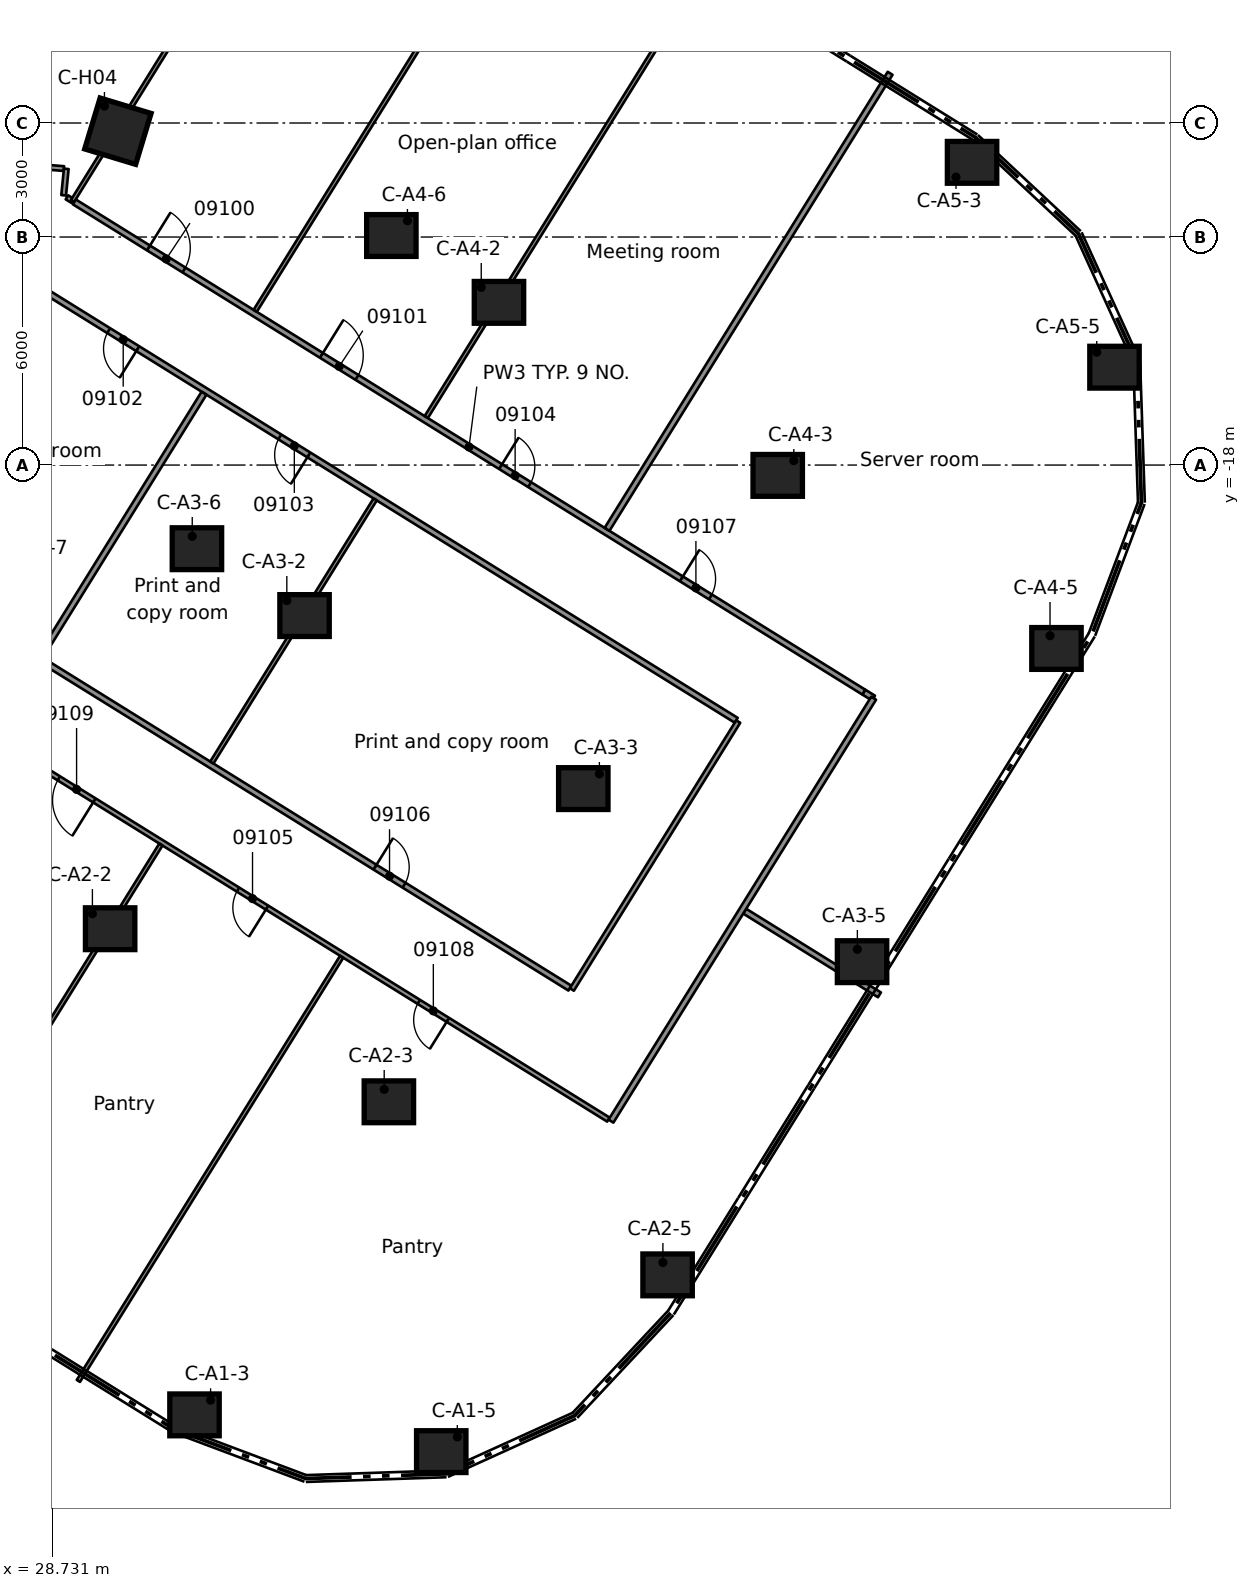
"""IFC4 building model, lengths in metres.
Left out: names, types, materials, properties, quantities, classifications, styles, units other than length and angle.
Written with IfcOpenShell. Run it as: python <this file> out.ifc"""

import sys

from ifc_helpers import new_model, si_unit, direction, frame, frame_2d, origin, origin_2d, place, context, subcontext, project, spatial, rectangle, extrude, element, fill, save


model = new_model("IFC4")
c1 = context("Model", 3, precision=1e-05, world=origin(), true_north=direction((0.0, 1.0)))
c2 = subcontext(c1, "Body", "Model", "MODEL_VIEW")
j1 = project(units=[si_unit("LENGTHUNIT", "METRE"), si_unit("PLANEANGLEUNIT", "RADIAN")], contexts=[c1])
p1 = place(None, origin())
s1 = spatial("IfcSite", under=j1, at=p1, CompositionType="ELEMENT")
p2 = place(p1, origin())
s2 = spatial("IfcBuilding", under=s1, at=p2, CompositionType="ELEMENT")
p3 = place(p2, frame((0.0, 0.0, 40.8)))
s3 = spatial("IfcBuildingStorey", under=s2, at=p3, CompositionType="ELEMENT", Elevation=40.8)
for number, where, z_axis, x_axis in (
    (1, (32.475, -42.992, 0.0), (0.0, 0.0, 1.0), (1.0, 0.0, 0.0)),
    (2, (38.968, -43.959, 0.0), (0.0, 0.0, 1.0), (1.0, 0.0, 0.0)),
    (3, (30.255, -30.2, 0.0), (0.0, 0.0, 1.0), (1.0, 0.0, 0.0)),
    (4, (37.59, -34.754, 0.0), (0.0, 0.0, 1.0), (1.0, 0.0, 0.0)),
    (5, (44.924, -39.308, 0.0), (0.0, 0.0, 1.0), (1.0, 0.0, 0.0)),
    (6, (35.371, -21.96, 0.0), (0.0, 0.0, 1.0), (1.0, 0.0, 0.0)),
    (7, (42.706, -26.513, 0.0), (0.0, 0.0, 1.0), (1.0, 0.0, 0.0)),
    (8, (50.041, -31.067, 0.0), (0.0, 0.0, 1.0), (1.0, 0.0, 0.0)),
    (9, (32.539, -20.201, 0.0), (0.0, 0.0, 1.0), (1.0, 0.0, 0.0)),
    (10, (40.487, -13.719, 0.0), (0.0, 0.0, 1.0), (1.0, 0.0, 0.0)),
    (11, (47.822, -18.272, 0.0), (0.0, 0.0, 1.0), (1.0, 0.0, 0.0)),
    (12, (55.157, -22.826, 0.0), (0.0, 0.0, 1.0), (1.0, 0.0, 0.0)),
    (13, (37.655, -11.96, 0.0), (0.0, 0.0, 1.0), (1.0, 0.0, 0.0)),
    (14, (52.936, -10.035, 0.0), (0.0, 0.0, 1.0), (1.0, 0.0, 0.0)),
    (15, (56.684, -15.425, 0.0), (0.0, 0.0, 1.0), (1.0, 0.0, 0.0)),
):
    element("IfcColumn", number, at=place(p3, frame(where, z_axis=z_axis, x_axis=x_axis)), inside=s3, PredefinedType="COLUMN", context=c2, shape_type="SweptSolid", body=[
        extrude(rectangle(XDim=1.3, YDim=1.1, at=origin_2d()), origin(), (0.0, 0.0, 1.0), 3.5),
    ])
p4 = place(p3, frame((30.459, -9.215, 0.0), z_axis=(0.0, 0.0, 1.0), x_axis=(0.957152868392, -0.289583125422, 0.0)))
e16 = element("IfcColumn", 16, at=p4, inside=s3, PredefinedType="COLUMN", context=c2, shape_type="SweptSolid", body=[
    extrude(rectangle(XDim=1.4, YDim=1.4, at=origin_2d()), origin(), (0.0, 0.0, 1.0), 3.5),
])
p5 = place(p3, frame((43.367, -35.223, 0.0), z_axis=(0.0, 0.0, 1.0), x_axis=(-0.849563429412, 0.527486473197, 0.0)))
e17 = element("IfcWall", 17, at=p5, inside=s3, PredefinedType="PARTITIONING", context=c2, shape_type="SweptSolid", body=[
    extrude(rectangle(XDim=21.927, YDim=0.125, at=frame_2d((10.963, 0.0))), origin(), (0.0, 0.0, 1.0), 3.06),
])
p6 = place(p5, frame((10.574, 0.0, 0.0)))
e18 = element("IfcOpeningElement", 18, at=p6, cuts=e17, PredefinedType="OPENING", context=c2, shape_type="SweptSolid", body=[
    extrude(rectangle(XDim=0.9, YDim=2.1, at=frame_2d((0.45, 1.05))), frame((0.0, 0.073, 0.0), z_axis=(0.0, -1.0, 0.0), x_axis=(1.0, 0.0, 0.0)), (0.0, 0.0, 1.0), 0.145),
])
p7 = place(p5, frame((4.973, 0.0, 0.0)))
e19 = element("IfcOpeningElement", 19, at=p7, cuts=e17, PredefinedType="OPENING", context=c2, shape_type="SweptSolid", body=[
    extrude(rectangle(XDim=0.9, YDim=2.1, at=frame_2d((0.45, 1.05))), frame((0.0, 0.073, 0.0), z_axis=(0.0, -1.0, 0.0), x_axis=(1.0, 0.0, 0.0)), (0.0, 0.0, 1.0), 0.145),
])
p8 = place(p5, frame((15.923, 0.0, 0.0)))
e20 = element("IfcOpeningElement", 20, at=p8, cuts=e17, PredefinedType="OPENING", context=c2, shape_type="SweptSolid", body=[
    extrude(rectangle(XDim=1.1, YDim=2.1, at=frame_2d((0.55, 1.05))), frame((0.0, 0.073, 0.0), z_axis=(0.0, -1.0, 0.0), x_axis=(1.0, 0.0, 0.0)), (0.0, 0.0, 1.0), 0.145),
])
p9 = place(p3, frame((24.028, -20.39, 0.0), z_axis=(0.0, 0.0, 1.0), x_axis=(0.8496545068, -0.527339756775, 0.0)))
e21 = element("IfcWall", 21, at=p9, inside=s3, PredefinedType="PARTITIONING", context=c2, shape_type="SweptSolid", body=[
    extrude(rectangle(XDim=21.569, YDim=0.15, at=frame_2d((10.784, 0.0))), origin(), (0.0, 0.0, 1.0), 3.06),
])
p10 = place(p9, frame((15.532, 0.0, 0.0)))
e22 = element("IfcOpeningElement", 22, at=p10, cuts=e21, PredefinedType="OPENING", context=c2, shape_type="SweptSolid", body=[
    extrude(rectangle(XDim=0.9, YDim=2.1, at=frame_2d((0.45, 1.05))), frame((0.0, 0.085, 0.0), z_axis=(0.0, -1.0, 0.0), x_axis=(1.0, 0.0, 0.0)), (0.0, 0.0, 1.0), 0.17),
])
p11 = place(p3, frame((46.953, -29.739, 0.0), z_axis=(0.0, 0.0, 1.0), x_axis=(0.849653722919, -0.527341019767, 0.0)))
e23 = element("IfcWall", 23, at=p11, inside=s3, PredefinedType="PARTITIONING", context=c2, shape_type="SweptSolid", body=[
    extrude(rectangle(XDim=4.174, YDim=0.15, at=frame_2d((2.087, 0.0))), origin(), (0.0, 0.0, 1.0), 3.06),
])
p12 = place(p3, frame((46.73, -24.716, 0.0), z_axis=(0.0, 0.0, 1.0), x_axis=(-0.849574284109, 0.527468990349, 0.0)))
e24 = element("IfcWall", 24, at=p12, inside=s3, PredefinedType="PARTITIONING", context=c2, shape_type="SweptSolid", body=[
    extrude(rectangle(XDim=21.645, YDim=0.15, at=frame_2d((10.822, 0.0))), origin(), (0.0, 0.0, 1.0), 3.06),
])
p13 = place(p12, frame((18.537, 0.0, 0.0)))
e25 = element("IfcOpeningElement", 25, at=p13, cuts=e24, PredefinedType="OPENING", context=c2, shape_type="SweptSolid", body=[
    extrude(rectangle(XDim=0.9, YDim=2.1, at=frame_2d((0.45, 1.05))), frame((0.0, 0.085, 0.0), z_axis=(0.0, -1.0, 0.0), x_axis=(1.0, 0.0, 0.0)), (0.0, 0.0, 1.0), 0.17),
])
p14 = place(p12, frame((13.237, 0.0, 0.0)))
e26 = element("IfcOpeningElement", 26, at=p14, cuts=e24, PredefinedType="OPENING", context=c2, shape_type="SweptSolid", body=[
    extrude(rectangle(XDim=0.9, YDim=2.1, at=frame_2d((0.45, 1.05))), frame((0.0, 0.085, 0.0), z_axis=(0.0, -1.0, 0.0), x_axis=(1.0, 0.0, 0.0)), (0.0, 0.0, 1.0), 0.17),
])
p15 = place(p3, frame((50.088, -23.975, 0.0), z_axis=(0.0, 0.0, 1.0), x_axis=(0.850230466056, -0.526410633051, 0.0)))
e27 = element("IfcWall", 27, at=p15, inside=s3, PredefinedType="PARTITIONING", context=c2, shape_type="SweptSolid", body=[
    extrude(rectangle(XDim=0.3, YDim=0.15, at=frame_2d((0.15, 0.0))), origin(), (0.0, 0.0, 1.0), 3.06),
])
p16 = place(p3, frame((29.31, -11.074, 0.0), z_axis=(0.0, 0.0, 1.0), x_axis=(0.849545912719, -0.527514684329, 0.0)))
e28 = element("IfcWall", 28, at=p16, inside=s3, PredefinedType="PARTITIONING", context=c2, shape_type="SweptSolid", body=[
    extrude(rectangle(XDim=24.457, YDim=0.15, at=frame_2d((12.228, 0.0))), origin(), (0.0, 0.0, 1.0), 3.06),
])
p17 = place(p16, frame((2.3, 0.0, 0.0)))
e29 = element("IfcOpeningElement", 29, at=p17, cuts=e28, PredefinedType="OPENING", context=c2, shape_type="SweptSolid", body=[
    extrude(rectangle(XDim=1.1, YDim=2.1, at=frame_2d((0.55, 1.05))), frame((0.0, 0.085, 0.0), z_axis=(0.0, -1.0, 0.0), x_axis=(1.0, 0.0, 0.0)), (0.0, 0.0, 1.0), 0.17),
])
p18 = place(p16, frame((7.658, 0.0, 0.0)))
e30 = element("IfcOpeningElement", 30, at=p18, cuts=e28, PredefinedType="OPENING", context=c2, shape_type="SweptSolid", body=[
    extrude(rectangle(XDim=1.1, YDim=2.1, at=frame_2d((0.55, 1.05))), frame((0.0, 0.085, 0.0), z_axis=(0.0, -1.0, 0.0), x_axis=(1.0, 0.0, 0.0)), (0.0, 0.0, 1.0), 0.17),
])
p19 = place(p16, frame((13.207, 0.0, 0.0)))
e31 = element("IfcOpeningElement", 31, at=p19, cuts=e28, PredefinedType="OPENING", context=c2, shape_type="SweptSolid", body=[
    extrude(rectangle(XDim=0.9, YDim=2.1, at=frame_2d((0.45, 1.05))), frame((0.0, 0.085, 0.0), z_axis=(0.0, -1.0, 0.0), x_axis=(1.0, 0.0, 0.0)), (0.0, 0.0, 1.0), 0.17),
])
p20 = place(p16, frame((18.806, 0.0, 0.0)))
e32 = element("IfcOpeningElement", 32, at=p20, cuts=e28, PredefinedType="OPENING", context=c2, shape_type="SweptSolid", body=[
    extrude(rectangle(XDim=0.9, YDim=2.1, at=frame_2d((0.45, 1.05))), frame((0.0, 0.085, 0.0), z_axis=(0.0, -1.0, 0.0), x_axis=(1.0, 0.0, 0.0)), (0.0, 0.0, 1.0), 0.17),
])
p21 = place(p3, frame((29.117, -10.955, 0.0), z_axis=(0.0, 0.0, 1.0), x_axis=(0.851611075983, -0.524174184087, 0.0)))
e33 = element("IfcWall", 33, at=p21, inside=s3, PredefinedType="PARTITIONING", context=c2, shape_type="SweptSolid", body=[
    extrude(rectangle(XDim=0.177, YDim=0.125, at=frame_2d((0.089, 0.0))), origin(), (0.0, 0.0, 1.0), 3.06),
])
p22 = place(p3, frame((29.04, -10.199, 0.0), z_axis=(0.0, 0.0, 1.0), x_axis=(-0.996840412967, 0.079430416561, 0.0)))
e34 = element("IfcWall", 34, at=p22, inside=s3, PredefinedType="PARTITIONING", context=c2, shape_type="SweptSolid", body=[
    extrude(rectangle(XDim=7.552, YDim=0.125, at=frame_2d((3.776, 0.0))), origin(), (0.0, 0.0, 1.0), 3.06),
])
p23 = place(p3, frame((43.434, -35.263, 0.0), z_axis=(0.0, 0.0, 1.0), x_axis=(0.527631447849, 0.849473398783, 0.0)))
e35 = element("IfcWall", 35, at=p23, inside=s3, PredefinedType="PARTITIONING", context=c2, shape_type="SweptSolid", body=[
    extrude(rectangle(XDim=13.1, YDim=0.15, at=frame_2d((6.55, 0.0))), origin(), (0.0, 0.0, 1.0), 3.06),
])
p24 = place(p3, frame((42.405, -31.799, 0.0), z_axis=(0.0, 0.0, 1.0), x_axis=(0.527540070889, 0.849530148733, 0.0)))
e36 = element("IfcWall", 36, at=p24, inside=s3, PredefinedType="PARTITIONING", context=c2, shape_type="SweptSolid", body=[
    extrude(rectangle(XDim=8.299, YDim=0.125, at=frame_2d((4.149, 0.0))), origin(), (0.0, 0.0, 1.0), 3.06),
])
p25 = place(p3, frame((29.419, -42.099, 0.0), z_axis=(0.0, 0.0, 1.0), x_axis=(0.527437340002, 0.849593933813, 0.0)))
e37 = element("IfcWall", 37, at=p25, inside=s3, PredefinedType="PARTITIONING", context=c2, shape_type="SweptSolid", body=[
    extrude(rectangle(XDim=13.137, YDim=0.1, at=frame_2d((6.568, 0.0))), origin(), (0.0, 0.0, 1.0), 3.06),
])
p26 = place(p3, frame((43.331, -19.691, 0.0), z_axis=(0.0, 0.0, 1.0), x_axis=(0.527429557997, 0.849598764919, 0.0)))
e38 = element("IfcWall", 38, at=p26, inside=s3, PredefinedType="PARTITIONING", context=c2, shape_type="SweptSolid", body=[
    extrude(rectangle(XDim=14.123, YDim=0.15, at=frame_2d((7.062, 0.0))), origin(), (0.0, 0.0, 1.0), 3.06),
])
p27 = place(p3, frame((24.662, -39.146, 0.0), z_axis=(0.0, 0.0, 1.0), x_axis=(0.527445667816, 0.849588763757, 0.0)))
e39 = element("IfcWall", 39, at=p27, inside=s3, PredefinedType="PARTITIONING", context=c2, shape_type="SweptSolid", body=[
    extrude(rectangle(XDim=13.137, YDim=0.1, at=frame_2d((6.568, 0.0))), origin(), (0.0, 0.0, 1.0), 3.06),
])
p28 = place(p3, frame((32.931, -25.828, 0.0), z_axis=(0.0, 0.0, 1.0), x_axis=(0.527378524743, 0.849630444158, 0.0)))
e40 = element("IfcWall", 40, at=p28, inside=s3, PredefinedType="PARTITIONING", context=c2, shape_type="SweptSolid", body=[
    extrude(rectangle(XDim=8.148, YDim=0.1, at=frame_2d((4.074, 0.0))), origin(), (0.0, 0.0, 1.0), 3.06),
])
p29 = place(p3, frame((38.574, -16.737, 0.0), z_axis=(0.0, 0.0, 1.0), x_axis=(0.527429557997, 0.849598764919, 0.0)))
e41 = element("IfcWall", 41, at=p29, inside=s3, PredefinedType="PARTITIONING", context=c2, shape_type="SweptSolid", body=[
    extrude(rectangle(XDim=14.123, YDim=0.1, at=frame_2d((7.062, 0.0))), origin(), (0.0, 0.0, 1.0), 3.06),
])
p30 = place(p3, frame((28.428, -23.032, 0.0), z_axis=(0.0, 0.0, 1.0), x_axis=(0.527432232041, 0.84959710487, 0.0)))
e42 = element("IfcWall", 42, at=p30, inside=s3, PredefinedType="PARTITIONING", context=c2, shape_type="SweptSolid", body=[
    extrude(rectangle(XDim=8.147, YDim=0.15, at=frame_2d((4.074, 0.0))), origin(), (0.0, 0.0, 1.0), 3.06),
])
p31 = place(p3, frame((34.072, -13.942, 0.0), z_axis=(0.0, 0.0, 1.0), x_axis=(0.527437304247, 0.84959395601, 0.0)))
e43 = element("IfcWall", 43, at=p31, inside=s3, PredefinedType="PARTITIONING", context=c2, shape_type="SweptSolid", body=[
    extrude(rectangle(XDim=14.123, YDim=0.1, at=frame_2d((7.062, 0.0))), origin(), (0.0, 0.0, 1.0), 3.06),
])
p32 = place(p3, frame((29.268, -11.048, 0.0), z_axis=(0.0, 0.0, 1.0), x_axis=(0.527446323462, 0.849588356716, 0.0)))
e44 = element("IfcWall", 44, at=p32, inside=s3, PredefinedType="PARTITIONING", context=c2, shape_type="SweptSolid", body=[
    extrude(rectangle(XDim=14.199, YDim=0.1, at=frame_2d((7.099, 0.0))), origin(), (0.0, 0.0, 1.0), 3.06),
])
p33 = place(p3, frame((29.032, -10.902, 0.0), z_axis=(0.0, 0.0, 1.0), x_axis=(0.098777968406, 0.995109497974, 0.0)))
e45 = element("IfcWall", 45, at=p33, inside=s3, PredefinedType="PARTITIONING", context=c2, shape_type="SweptSolid", body=[
    extrude(rectangle(XDim=0.699, YDim=0.125, at=frame_2d((0.35, 0.0))), origin(), (0.0, 0.0, 1.0), 3.06),
])
p34 = place(p17, origin())
e46 = element("IfcDoor", 46, at=p34, inside=s3, OperationType="SINGLE_SWING_LEFT", PredefinedType="DOOR", context=c2, shape_type="SweptSolid", body=[
    extrude(rectangle(XDim=1.1, YDim=2.1, at=frame_2d((0.55, 1.05))), frame((0.0, 0.025, 0.0), z_axis=(0.0, -1.0, 0.0), x_axis=(1.0, 0.0, 0.0)), (0.0, 0.0, 1.0), 0.05),
])
fill(e29, e46)
p35 = place(p18, origin())
e47 = element("IfcDoor", 47, at=p35, inside=s3, OperationType="SINGLE_SWING_LEFT", PredefinedType="DOOR", context=c2, shape_type="SweptSolid", body=[
    extrude(rectangle(XDim=1.1, YDim=2.1, at=frame_2d((0.55, 1.05))), frame((0.0, 0.025, 0.0), z_axis=(0.0, -1.0, 0.0), x_axis=(1.0, 0.0, 0.0)), (0.0, 0.0, 1.0), 0.05),
])
fill(e30, e47)
p36 = place(p13, origin())
e48 = element("IfcDoor", 48, at=p36, inside=s3, OperationType="SINGLE_SWING_RIGHT", PredefinedType="DOOR", context=c2, shape_type="SweptSolid", body=[
    extrude(rectangle(XDim=0.9, YDim=2.1, at=frame_2d((0.45, 1.05))), frame((0.0, 0.025, 0.0), z_axis=(0.0, -1.0, 0.0), x_axis=(1.0, 0.0, 0.0)), (0.0, 0.0, 1.0), 0.05),
])
fill(e25, e48)
p37 = place(p14, origin())
e49 = element("IfcDoor", 49, at=p37, inside=s3, OperationType="SINGLE_SWING_RIGHT", PredefinedType="DOOR", context=c2, shape_type="SweptSolid", body=[
    extrude(rectangle(XDim=0.9, YDim=2.1, at=frame_2d((0.45, 1.05))), frame((0.0, 0.025, 0.0), z_axis=(0.0, -1.0, 0.0), x_axis=(1.0, 0.0, 0.0)), (0.0, 0.0, 1.0), 0.05),
])
fill(e26, e49)
p38 = place(p19, origin())
e50 = element("IfcDoor", 50, at=p38, inside=s3, OperationType="SINGLE_SWING_RIGHT", PredefinedType="DOOR", context=c2, shape_type="SweptSolid", body=[
    extrude(rectangle(XDim=0.9, YDim=2.1, at=frame_2d((0.45, 1.05))), frame((0.0, 0.025, 0.0), z_axis=(0.0, -1.0, 0.0), x_axis=(1.0, 0.0, 0.0)), (0.0, 0.0, 1.0), 0.05),
])
fill(e31, e50)
p39 = place(p6, origin())
e51 = element("IfcDoor", 51, at=p39, inside=s3, OperationType="SINGLE_SWING_RIGHT", PredefinedType="DOOR", context=c2, shape_type="SweptSolid", body=[
    extrude(rectangle(XDim=0.9, YDim=2.1, at=frame_2d((0.45, 1.05))), frame((0.0, 0.025, 0.0), z_axis=(0.0, -1.0, 0.0), x_axis=(1.0, 0.0, 0.0)), (0.0, 0.0, 1.0), 0.05),
])
fill(e18, e51)
p40 = place(p10, origin())
e52 = element("IfcDoor", 52, at=p40, inside=s3, OperationType="SINGLE_SWING_RIGHT", PredefinedType="DOOR", context=c2, shape_type="SweptSolid", body=[
    extrude(rectangle(XDim=0.9, YDim=2.1, at=frame_2d((0.45, 1.05))), frame((0.0, 0.025, 0.0), z_axis=(0.0, -1.0, 0.0), x_axis=(1.0, 0.0, 0.0)), (0.0, 0.0, 1.0), 0.05),
])
fill(e22, e52)
p41 = place(p20, origin())
e53 = element("IfcDoor", 53, at=p41, inside=s3, OperationType="SINGLE_SWING_RIGHT", PredefinedType="DOOR", context=c2, shape_type="SweptSolid", body=[
    extrude(rectangle(XDim=0.9, YDim=2.1, at=frame_2d((0.45, 1.05))), frame((0.0, 0.025, 0.0), z_axis=(0.0, -1.0, 0.0), x_axis=(1.0, 0.0, 0.0)), (0.0, 0.0, 1.0), 0.05),
])
fill(e32, e53)
p42 = place(p7, origin())
e54 = element("IfcDoor", 54, at=p42, inside=s3, OperationType="SINGLE_SWING_LEFT", PredefinedType="DOOR", context=c2, shape_type="SweptSolid", body=[
    extrude(rectangle(XDim=0.9, YDim=2.1, at=frame_2d((0.45, 1.05))), frame((0.0, 0.025, 0.0), z_axis=(0.0, -1.0, 0.0), x_axis=(1.0, 0.0, 0.0)), (0.0, 0.0, 1.0), 0.05),
])
fill(e19, e54)
p43 = place(p8, origin())
e55 = element("IfcDoor", 55, at=p43, inside=s3, OperationType="SINGLE_SWING_RIGHT", PredefinedType="DOOR", context=c2, shape_type="SweptSolid", body=[
    extrude(rectangle(XDim=1.1, YDim=2.1, at=frame_2d((0.55, 1.05))), frame((0.0, 0.025, 0.0), z_axis=(0.0, -1.0, 0.0), x_axis=(1.0, 0.0, 0.0)), (0.0, 0.0, 1.0), 0.05),
])
fill(e20, e55)
save(model, sys.argv[1])
